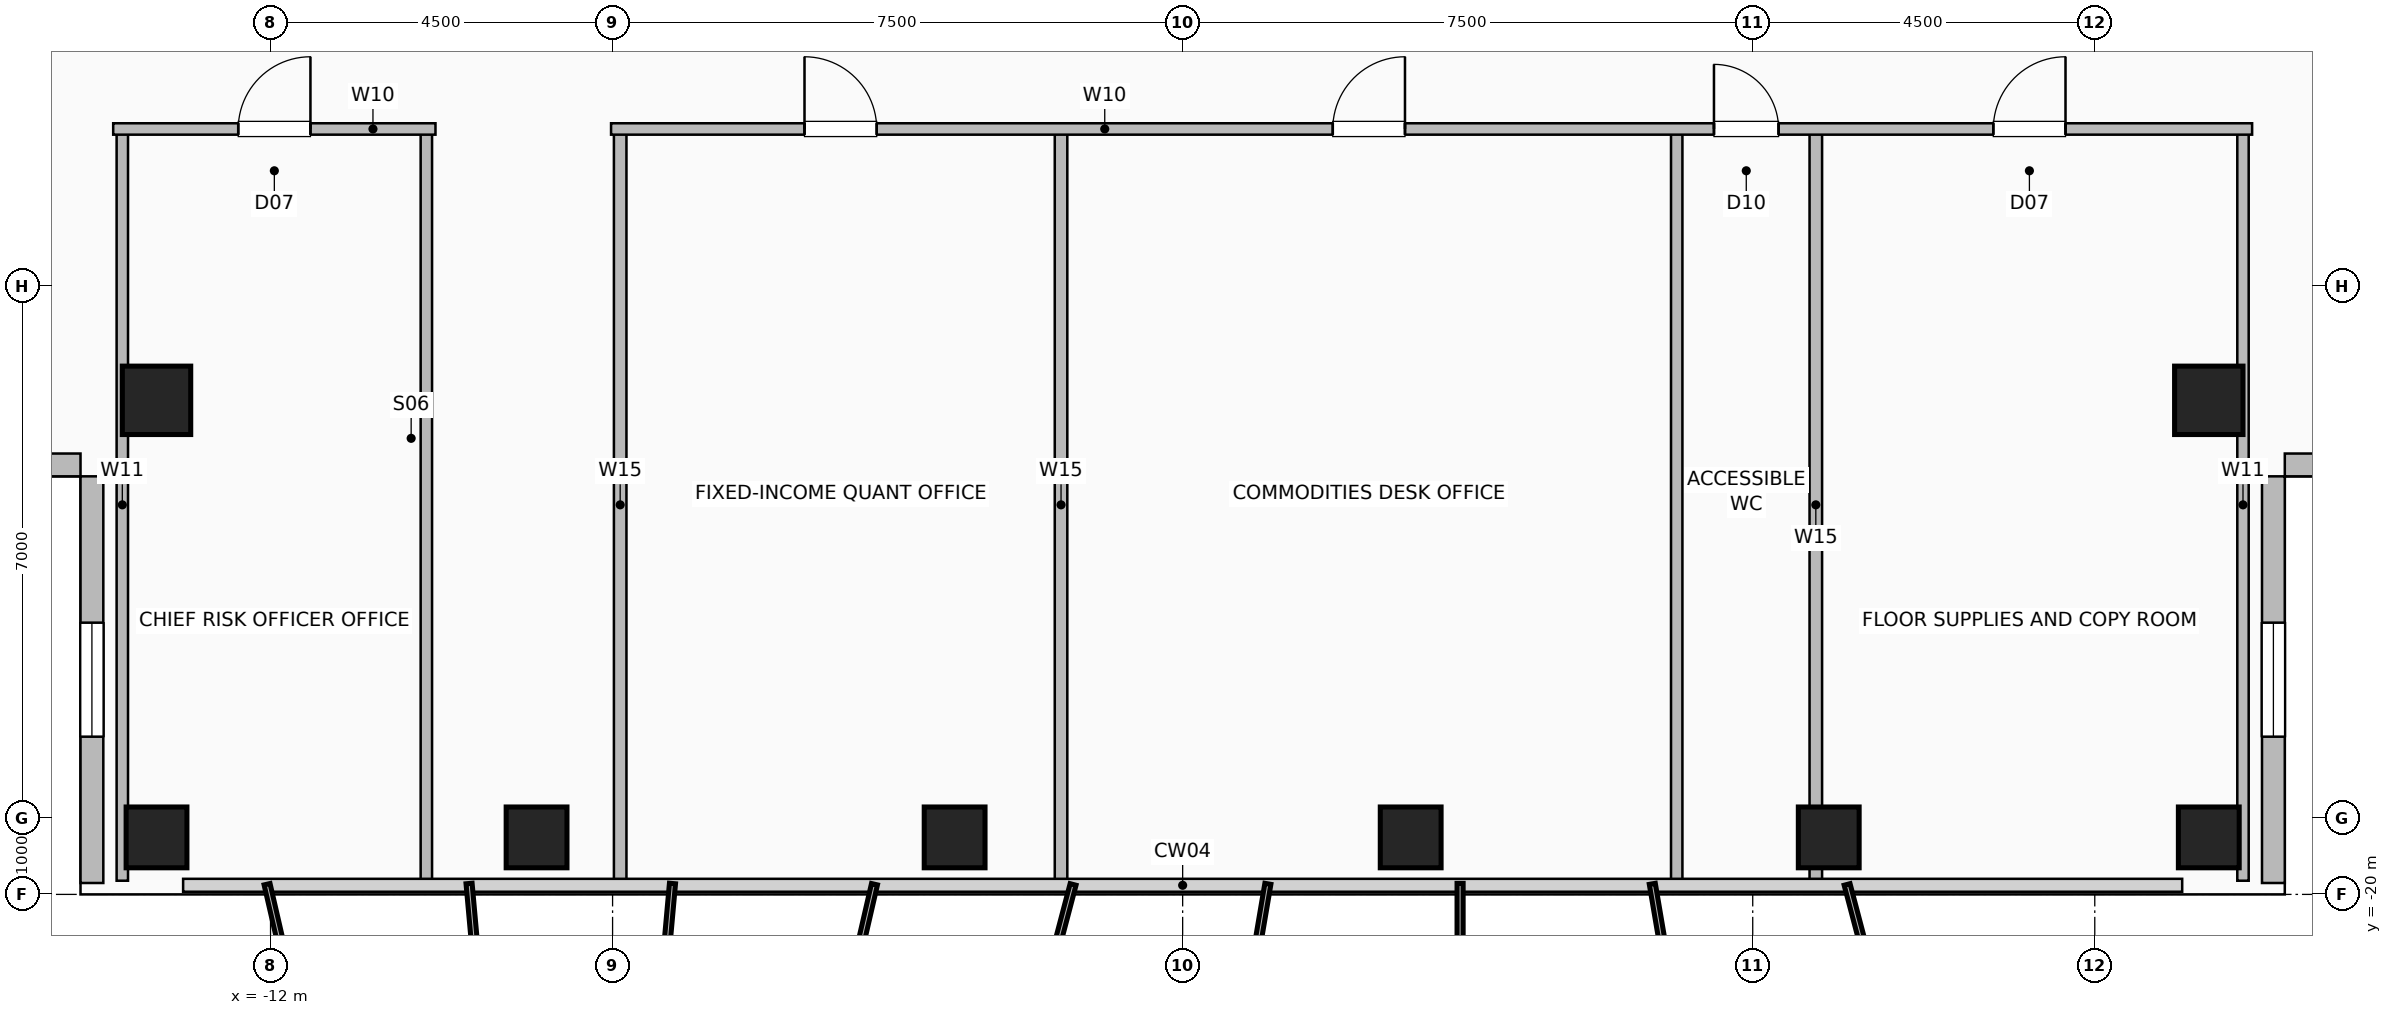
"""IFC4 building model, lengths in metres.
Left out: names, types, materials, properties, quantities, classifications, styles, units other than length and angle.
Written with IfcOpenShell. Run it as: python <this file> out.ifc"""

import sys

from ifc_helpers import new_model, si_unit, direction, frame, frame_2d, origin, origin_2d, place, context, subcontext, project, spatial, rectangle, hollow_rectangle, extrude, element, fill, save


model = new_model("IFC4")
c1 = context("Model", 3, precision=1e-05, world=origin(), true_north=direction((0.0, 1.0)))
c2 = subcontext(c1, "Body", "Model", "MODEL_VIEW")
j1 = project(units=[si_unit("LENGTHUNIT", "METRE"), si_unit("PLANEANGLEUNIT", "RADIAN")], contexts=[c1])
p1 = place(None, origin())
s1 = spatial("IfcSite", under=j1, at=p1, CompositionType="ELEMENT")
p2 = place(p1, origin())
s2 = spatial("IfcBuilding", under=s1, at=p2, CompositionType="ELEMENT")
p3 = place(p2, frame((0.0, 0.0, 216.6)))
s3 = spatial("IfcBuildingStorey", under=s2, at=p3, CompositionType="ELEMENT", Elevation=216.6)
for number, where, z_axis, x_axis in (
    (1, (-13.5, -19.25, 0.0), (0.0, 0.0, 1.0), (1.0, 0.0, 0.0)),
    (2, (-8.5, -19.25, 0.0), (0.0, 0.0, 1.0), (1.0, 0.0, 0.0)),
    (3, (-3.0, -19.25, 0.0), (0.0, 0.0, 1.0), (1.0, 0.0, 0.0)),
    (4, (3.0, -19.25, 0.0), (0.0, 0.0, 1.0), (1.0, 0.0, 0.0)),
    (5, (8.5, -19.25, 0.0), (0.0, 0.0, 1.0), (1.0, 0.0, 0.0)),
    (6, (13.5, -19.25, 0.0), (0.0, 0.0, 1.0), (1.0, 0.0, 0.0)),
):
    element("IfcColumn", number, at=place(p3, frame(where, z_axis=z_axis, x_axis=x_axis)), inside=s3, PredefinedType="COLUMN", context=c2, shape_type="SweptSolid", body=[
        extrude(hollow_rectangle(XDim=0.8, YDim=0.8, WallThickness=0.04, at=origin_2d()), origin(), (0.0, 0.0, 1.0), 3.6),
    ])
for number, where, z_axis, x_axis in (
    (7, (-13.5, -13.5, 0.0), (0.0, 0.0, 1.0), (1.0, 0.0, 0.0)),
    (8, (13.5, -13.5, 0.0), (0.0, 0.0, 1.0), (1.0, 0.0, 0.0)),
):
    element("IfcColumn", number, at=place(p3, frame(where, z_axis=z_axis, x_axis=x_axis)), inside=s3, PredefinedType="COLUMN", context=c2, shape_type="SweptSolid", body=[
        extrude(hollow_rectangle(XDim=0.9, YDim=0.9, WallThickness=0.045, at=origin_2d()), origin(), (0.0, 0.0, 1.0), 3.6),
    ])
p4 = place(p3, frame((-14.35, -19.85, 0.0), z_axis=(0.0, 0.0, 1.0), x_axis=(0.0, 1.0, 0.0)))
e9 = element("IfcWall", 9, at=p4, inside=s3, PredefinedType="SOLIDWALL", context=c2, shape_type="SweptSolid", body=[
    extrude(rectangle(XDim=5.35, YDim=0.3, at=frame_2d((2.675, 0.0))), origin(), (0.0, 0.0, 1.0), 3.36),
])
p5 = place(p4, frame((1.925, 0.0, 0.9)))
e10 = element("IfcOpeningElement", 10, at=p5, cuts=e9, PredefinedType="OPENING", context=c2, shape_type="SweptSolid", body=[
    extrude(rectangle(XDim=1.5, YDim=1.8, at=frame_2d((0.75, 0.9))), frame((0.0, 0.16, 0.0), z_axis=(0.0, -1.0, 0.0), x_axis=(1.0, 0.0, 0.0)), (0.0, 0.0, 1.0), 0.32),
])
p6 = place(p3, frame((-19.85, -14.35, 0.0), z_axis=(0.0, 0.0, 1.0), x_axis=(1.0, 0.0, 0.0)))
e11 = element("IfcWall", 11, at=p6, inside=s3, PredefinedType="SOLIDWALL", context=c2, shape_type="SweptSolid", body=[
    extrude(rectangle(XDim=5.35, YDim=0.3, at=frame_2d((2.675, 0.0))), origin(), (0.0, 0.0, 1.0), 3.36),
])
p7 = place(p3, frame((14.35, -19.85, 0.0), z_axis=(0.0, 0.0, 1.0), x_axis=(0.0, 1.0, 0.0)))
e12 = element("IfcWall", 12, at=p7, inside=s3, PredefinedType="SOLIDWALL", context=c2, shape_type="SweptSolid", body=[
    extrude(rectangle(XDim=5.35, YDim=0.3, at=frame_2d((2.675, 0.0))), origin(), (0.0, 0.0, 1.0), 3.36),
])
p8 = place(p7, frame((1.925, 0.0, 0.9)))
e13 = element("IfcOpeningElement", 13, at=p8, cuts=e12, PredefinedType="OPENING", context=c2, shape_type="SweptSolid", body=[
    extrude(rectangle(XDim=1.5, YDim=1.8, at=frame_2d((0.75, 0.9))), frame((0.0, 0.16, 0.0), z_axis=(0.0, -1.0, 0.0), x_axis=(1.0, 0.0, 0.0)), (0.0, 0.0, 1.0), 0.32),
])
p9 = place(p3, frame((19.85, -14.35, 0.0), z_axis=(0.0, 0.0, 1.0), x_axis=(-1.0, 0.0, 0.0)))
e14 = element("IfcWall", 14, at=p9, inside=s3, PredefinedType="SOLIDWALL", context=c2, shape_type="SweptSolid", body=[
    extrude(rectangle(XDim=5.35, YDim=0.3, at=frame_2d((2.675, 0.0))), origin(), (0.0, 0.0, 1.0), 3.36),
])
for number, where, z_axis, x_axis in (
    (15, (-13.95, -19.82, 0.0), (0.0, 0.0, 1.0), (0.0, 1.0, 0.0)),
    (16, (-9.95, -19.82, 0.0), (0.0, 0.0, 1.0), (0.0, 1.0, 0.0)),
):
    element("IfcWall", number, at=place(p3, frame(where, z_axis=z_axis, x_axis=x_axis)), inside=s3, PredefinedType="PARTITIONING", context=c2, shape_type="SweptSolid", body=[
        extrude(rectangle(XDim=9.89, YDim=0.15, at=frame_2d((4.945, 0.0))), origin(), (0.0, 0.0, 1.0), 3.36),
    ])
p10 = place(p3, frame((-14.07, -9.93, 0.0), z_axis=(0.0, 0.0, 1.0), x_axis=(1.0, 0.0, 0.0)))
e17 = element("IfcWall", 17, at=p10, inside=s3, PredefinedType="PARTITIONING", context=c2, shape_type="SweptSolid", body=[
    extrude(rectangle(XDim=4.24, YDim=0.15, at=frame_2d((2.12, 0.0))), origin(), (0.0, 0.0, 1.0), 3.36),
])
p11 = place(p10, frame((1.645, 0.0, 0.0)))
e18 = element("IfcOpeningElement", 18, at=p11, cuts=e17, PredefinedType="OPENING", context=c2, shape_type="SweptSolid", body=[
    extrude(rectangle(XDim=0.95, YDim=2.06, at=frame_2d((0.475, 1.03))), frame((0.0, 0.085, 0.0), z_axis=(0.0, -1.0, 0.0), x_axis=(1.0, 0.0, 0.0)), (0.0, 0.0, 1.0), 0.17),
])
for number, where, z_axis, x_axis in (
    (19, (8.33, -19.82, 0.0), (0.0, 0.0, 1.0), (0.0, 1.0, 0.0)),
    (20, (-7.4, -19.82, 0.0), (0.0, 0.0, 1.0), (0.0, 1.0, 0.0)),
    (21, (-1.6, -19.82, 0.0), (0.0, 0.0, 1.0), (0.0, 1.0, 0.0)),
):
    element("IfcWall", number, at=place(p3, frame(where, z_axis=z_axis, x_axis=x_axis)), inside=s3, PredefinedType="PLUMBINGWALL", context=c2, shape_type="SweptSolid", body=[
        extrude(rectangle(XDim=9.89, YDim=0.165, at=frame_2d((4.945, 0.0))), origin(), (0.0, 0.0, 1.0), 3.36),
    ])
for number, where, z_axis, x_axis in (
    (22, (6.5, -19.82, 0.0), (0.0, 0.0, 1.0), (0.0, 1.0, 0.0)),
    (23, (13.95, -19.82, 0.0), (0.0, 0.0, 1.0), (0.0, 1.0, 0.0)),
):
    element("IfcWall", number, at=place(p3, frame(where, z_axis=z_axis, x_axis=x_axis)), inside=s3, PredefinedType="PARTITIONING", context=c2, shape_type="SweptSolid", body=[
        extrude(rectangle(XDim=9.89, YDim=0.15, at=frame_2d((4.945, 0.0))), origin(), (0.0, 0.0, 1.0), 3.36),
    ])
p12 = place(p3, frame((-7.52, -9.93, 0.0), z_axis=(0.0, 0.0, 1.0), x_axis=(1.0, 0.0, 0.0)))
e24 = element("IfcWall", 24, at=p12, inside=s3, PredefinedType="PARTITIONING", context=c2, shape_type="SweptSolid", body=[
    extrude(rectangle(XDim=21.59, YDim=0.15, at=frame_2d((10.795, 0.0))), origin(), (0.0, 0.0, 1.0), 3.36),
])
p13 = place(p12, frame((2.545, 0.0, 0.0)))
e25 = element("IfcOpeningElement", 25, at=p13, cuts=e24, PredefinedType="OPENING", context=c2, shape_type="SweptSolid", body=[
    extrude(rectangle(XDim=0.95, YDim=2.06, at=frame_2d((0.475, 1.03))), frame((0.0, 0.085, 0.0), z_axis=(0.0, -1.0, 0.0), x_axis=(1.0, 0.0, 0.0)), (0.0, 0.0, 1.0), 0.17),
])
p14 = place(p12, frame((9.495, 0.0, 0.0)))
e26 = element("IfcOpeningElement", 26, at=p14, cuts=e24, PredefinedType="OPENING", context=c2, shape_type="SweptSolid", body=[
    extrude(rectangle(XDim=0.95, YDim=2.06, at=frame_2d((0.475, 1.03))), frame((0.0, 0.085, 0.0), z_axis=(0.0, -1.0, 0.0), x_axis=(1.0, 0.0, 0.0)), (0.0, 0.0, 1.0), 0.17),
])
p15 = place(p12, frame((14.51, 0.0, 0.0)))
e27 = element("IfcOpeningElement", 27, at=p15, cuts=e24, PredefinedType="OPENING", context=c2, shape_type="SweptSolid", body=[
    extrude(rectangle(XDim=0.85, YDim=2.05, at=frame_2d((0.425, 1.025))), frame((0.0, 0.085, 0.0), z_axis=(0.0, -1.0, 0.0), x_axis=(1.0, 0.0, 0.0)), (0.0, 0.0, 1.0), 0.17),
])
p16 = place(p12, frame((18.185, 0.0, 0.0)))
e28 = element("IfcOpeningElement", 28, at=p16, cuts=e24, PredefinedType="OPENING", context=c2, shape_type="SweptSolid", body=[
    extrude(rectangle(XDim=0.95, YDim=2.06, at=frame_2d((0.475, 1.03))), frame((0.0, 0.085, 0.0), z_axis=(0.0, -1.0, 0.0), x_axis=(1.0, 0.0, 0.0)), (0.0, 0.0, 1.0), 0.17),
])
p17 = place(p5, origin())
e29 = element("IfcWindow", 29, at=p17, inside=s3, PartitioningType="SINGLE_PANEL", PredefinedType="WINDOW", context=c2, shape_type="SweptSolid", body=[
    extrude(rectangle(XDim=1.5, YDim=1.8, at=frame_2d((0.75, 0.9))), frame((0.0, 0.03, 0.0), z_axis=(0.0, -1.0, 0.0), x_axis=(1.0, 0.0, 0.0)), (0.0, 0.0, 1.0), 0.06),
])
fill(e10, e29)
p18 = place(p8, origin())
e30 = element("IfcWindow", 30, at=p18, inside=s3, PartitioningType="SINGLE_PANEL", PredefinedType="WINDOW", context=c2, shape_type="SweptSolid", body=[
    extrude(rectangle(XDim=1.5, YDim=1.8, at=frame_2d((0.75, 0.9))), frame((0.0, 0.03, 0.0), z_axis=(0.0, -1.0, 0.0), x_axis=(1.0, 0.0, 0.0)), (0.0, 0.0, 1.0), 0.06),
])
fill(e13, e30)
p19 = place(p11, origin())
e31 = element("IfcDoor", 31, at=p19, inside=s3, OperationType="SINGLE_SWING_RIGHT", PredefinedType="DOOR", context=c2, shape_type="SweptSolid", body=[
    extrude(rectangle(XDim=0.95, YDim=2.06, at=frame_2d((0.475, 1.03))), frame((0.0, 0.025, 0.0), z_axis=(0.0, -1.0, 0.0), x_axis=(1.0, 0.0, 0.0)), (0.0, 0.0, 1.0), 0.05),
])
fill(e18, e31)
p20 = place(p13, origin())
e32 = element("IfcDoor", 32, at=p20, inside=s3, OperationType="SINGLE_SWING_LEFT", PredefinedType="DOOR", context=c2, shape_type="SweptSolid", body=[
    extrude(rectangle(XDim=0.95, YDim=2.06, at=frame_2d((0.475, 1.03))), frame((0.0, 0.025, 0.0), z_axis=(0.0, -1.0, 0.0), x_axis=(1.0, 0.0, 0.0)), (0.0, 0.0, 1.0), 0.05),
])
fill(e25, e32)
p21 = place(p14, origin())
e33 = element("IfcDoor", 33, at=p21, inside=s3, OperationType="SINGLE_SWING_RIGHT", PredefinedType="DOOR", context=c2, shape_type="SweptSolid", body=[
    extrude(rectangle(XDim=0.95, YDim=2.06, at=frame_2d((0.475, 1.03))), frame((0.0, 0.025, 0.0), z_axis=(0.0, -1.0, 0.0), x_axis=(1.0, 0.0, 0.0)), (0.0, 0.0, 1.0), 0.05),
])
fill(e26, e33)
p22 = place(p15, origin())
e34 = element("IfcDoor", 34, at=p22, inside=s3, OperationType="SINGLE_SWING_LEFT", PredefinedType="DOOR", context=c2, shape_type="SweptSolid", body=[
    extrude(rectangle(XDim=0.85, YDim=2.05, at=frame_2d((0.425, 1.025))), frame((0.0, 0.025, 0.0), z_axis=(0.0, -1.0, 0.0), x_axis=(1.0, 0.0, 0.0)), (0.0, 0.0, 1.0), 0.05),
])
fill(e27, e34)
p23 = place(p16, origin())
e35 = element("IfcDoor", 35, at=p23, inside=s3, OperationType="SINGLE_SWING_RIGHT", PredefinedType="DOOR", context=c2, shape_type="SweptSolid", body=[
    extrude(rectangle(XDim=0.95, YDim=2.06, at=frame_2d((0.475, 1.03))), frame((0.0, 0.025, 0.0), z_axis=(0.0, -1.0, 0.0), x_axis=(1.0, 0.0, 0.0)), (0.0, 0.0, 1.0), 0.05),
])
fill(e28, e35)
save(model, sys.argv[1])
